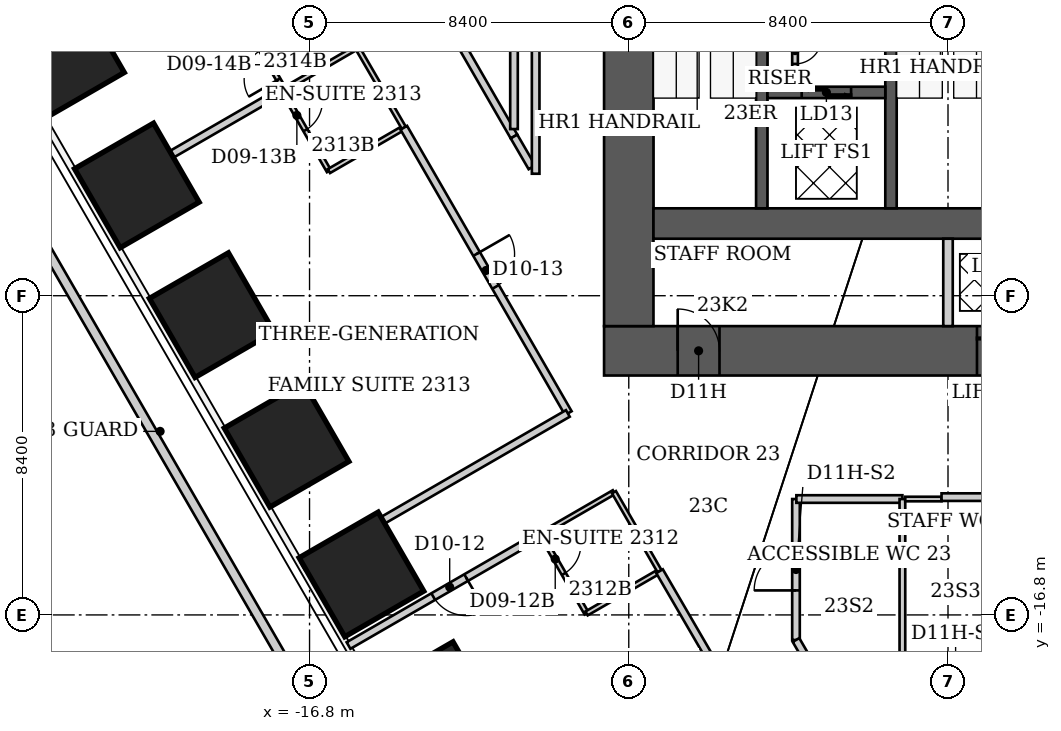
"""IFC4 building model, lengths in metres.
Left out: names, types, materials, properties, quantities, classifications, styles, units other than length and angle.
Written with IfcOpenShell. Run it as: python <this file> out.ifc"""

import sys

from ifc_helpers import new_model, si_unit, direction, frame, frame_2d, origin, origin_2d, place, context, subcontext, project, spatial, rectangle, extrude, clip, halfspace, element, fill, save


model = new_model("IFC4")
c1 = context("Model", 3, precision=1e-05, world=origin(), true_north=direction((0.0, 1.0)))
c2 = subcontext(c1, "Body", "Model", "MODEL_VIEW")
j1 = project(units=[si_unit("LENGTHUNIT", "METRE"), si_unit("PLANEANGLEUNIT", "RADIAN")], contexts=[c1])
p1 = place(None, origin())
s1 = spatial("IfcSite", under=j1, at=p1, CompositionType="ELEMENT")
p2 = place(p1, origin())
s2 = spatial("IfcBuilding", under=s1, at=p2, CompositionType="ELEMENT")
p3 = place(p2, frame((0.0, 0.0, 96.8)))
s3 = spatial("IfcBuildingStorey", under=s2, at=p3, CompositionType="ELEMENT", Elevation=96.8)
p4 = place(p3, frame((-13.464, -19.147, -0.064), z_axis=(0.0, 0.0, 1.0), x_axis=(-0.866025403784, -0.5, 0.0)))
e1 = element("IfcColumn", 1, at=p4, inside=s3, PredefinedType="COLUMN", context=c2, shape_type="SweptSolid", body=[
    clip(extrude(rectangle(XDim=2.4, YDim=2.4, at=origin_2d()), origin(), (0.0, 0.0, 1.0), 3.865), halfspace(frame((0.0, 0.0, 0.064)), True)),
])
p5 = place(p3, frame((-15.434, -15.735, -0.056), z_axis=(0.0, 0.0, 1.0), x_axis=(-0.866025403784, -0.5, 0.0)))
e2 = element("IfcColumn", 2, at=p5, inside=s3, PredefinedType="COLUMN", context=c2, shape_type="SweptSolid", body=[
    clip(extrude(rectangle(XDim=2.4, YDim=2.4, at=origin_2d()), origin(), (0.0, 0.0, 1.0), 3.856), halfspace(frame((0.0, 0.0, 0.056)), True)),
])
for number, where, z_axis, x_axis in (
    (3, (-17.404, -12.323, -0.048), (0.0, 0.0, 1.0), (-0.866, -0.5, 0.0)),
    (4, (-19.374, -8.911, -0.048), (0.0, 0.0, 1.0), (-0.866, -0.5, 0.0)),
):
    element("IfcColumn", number, at=place(p3, frame(where, z_axis=z_axis, x_axis=x_axis)), inside=s3, PredefinedType="COLUMN", context=c2, shape_type="SweptSolid", body=[
        clip(extrude(rectangle(XDim=2.4, YDim=2.4, at=origin_2d()), origin(), (0.0, 0.0, 1.0), 3.848), halfspace(frame((0.0, 0.0, 0.048)), True)),
    ])
p6 = place(p3, frame((-21.344, -5.499, -0.056), z_axis=(0.0, 0.0, 1.0), x_axis=(-0.866025403784, -0.5, 0.0)))
e5 = element("IfcColumn", 5, at=p6, inside=s3, PredefinedType="COLUMN", context=c2, shape_type="SweptSolid", body=[
    clip(extrude(rectangle(XDim=2.4, YDim=2.4, at=origin_2d()), origin(), (0.0, 0.0, 1.0), 3.856), halfspace(frame((0.0, 0.0, 0.056)), True)),
])
p7 = place(p3, frame((-23.314, -2.087, -0.064), z_axis=(0.0, 0.0, 1.0), x_axis=(-0.866025403784, -0.5, 0.0)))
e6 = element("IfcColumn", 6, at=p7, inside=s3, PredefinedType="COLUMN", context=c2, shape_type="SweptSolid", body=[
    clip(extrude(rectangle(XDim=2.4, YDim=2.4, at=origin_2d()), origin(), (0.0, 0.0, 1.0), 3.865), halfspace(frame((0.0, 0.0, 0.064)), True)),
])
p8 = place(p3, frame((-9.05, -9.85, 0.0), z_axis=(0.0, 0.0, 1.0), x_axis=(1.0, 0.0, 0.0)))
e7 = element("IfcWall", 7, at=p8, inside=s3, PredefinedType="SHEAR", context=c2, shape_type="SweptSolid", body=[
    extrude(rectangle(XDim=18.1, YDim=1.3, at=frame_2d((9.05, 0.0))), origin(), (0.0, 0.0, 1.0), 3.8),
])
p9 = place(p8, frame((1.938, 0.0, 0.0)))
e8 = element("IfcOpeningElement", 8, at=p9, cuts=e7, PredefinedType="OPENING", context=c2, shape_type="SweptSolid", body=[
    extrude(rectangle(XDim=1.1, YDim=2.2, at=frame_2d((0.55, 1.1))), frame((0.0, 0.65, 0.0), z_axis=(0.0, -1.0, 0.0), x_axis=(1.0, 0.0, 0.0)), (0.0, 0.0, 1.0), 1.3),
])
p10 = place(p8, frame((9.812, 0.0, 0.0)))
e9 = element("IfcOpeningElement", 9, at=p10, cuts=e7, PredefinedType="OPENING", context=c2, shape_type="SweptSolid", body=[
    extrude(rectangle(XDim=1.1, YDim=2.1, at=frame_2d((0.55, 1.05))), frame((0.0, 0.65, 0.0), z_axis=(0.0, -1.0, 0.0), x_axis=(1.0, 0.0, 0.0)), (0.0, 0.0, 1.0), 1.3),
])
p11 = place(p8, frame((12.438, 0.0, 0.0)))
e10 = element("IfcOpeningElement", 10, at=p11, cuts=e7, PredefinedType="OPENING", context=c2, shape_type="SweptSolid", body=[
    extrude(rectangle(XDim=1.1, YDim=2.1, at=frame_2d((0.55, 1.05))), frame((0.0, 0.65, 0.0), z_axis=(0.0, -1.0, 0.0), x_axis=(1.0, 0.0, 0.0)), (0.0, 0.0, 1.0), 1.3),
])
p12 = place(p8, frame((15.062, 0.0, 0.0)))
e11 = element("IfcOpeningElement", 11, at=p12, cuts=e7, PredefinedType="OPENING", context=c2, shape_type="SweptSolid", body=[
    extrude(rectangle(XDim=1.1, YDim=2.1, at=frame_2d((0.55, 1.05))), frame((0.0, 0.65, 0.0), z_axis=(0.0, -1.0, 0.0), x_axis=(1.0, 0.0, 0.0)), (0.0, 0.0, 1.0), 1.3),
])
p13 = place(p3, frame((-8.4, -9.2, 0.0), z_axis=(0.0, 0.0, 1.0), x_axis=(0.0, 1.0, 0.0)))
e12 = element("IfcWall", 12, at=p13, inside=s3, PredefinedType="SHEAR", context=c2, shape_type="SweptSolid", body=[
    extrude(rectangle(XDim=15.3, YDim=1.3, at=frame_2d((7.65, 0.0))), origin(), (0.0, 0.0, 1.0), 3.8),
])
p14 = place(p13, frame((10.7, 0.0, 0.0)))
e13 = element("IfcOpeningElement", 13, at=p14, cuts=e12, PredefinedType="OPENING", context=c2, shape_type="SweptSolid", body=[
    extrude(rectangle(XDim=1.2, YDim=2.2, at=frame_2d((0.6, 1.1))), frame((0.0, 0.65, 0.0), z_axis=(0.0, -1.0, 0.0), x_axis=(1.0, 0.0, 0.0)), (0.0, 0.0, 1.0), 1.3),
])
p15 = place(p3, frame((-7.75, -6.5, 0.0), z_axis=(0.0, 0.0, 1.0), x_axis=(1.0, 0.0, 0.0)))
e14 = element("IfcWall", 14, at=p15, inside=s3, PredefinedType="SHEAR", context=c2, shape_type="SweptSolid", body=[
    extrude(rectangle(XDim=15.5, YDim=0.8, at=frame_2d((7.75, 0.0))), origin(), (0.0, 0.0, 1.0), 3.8),
])
for number, where, z_axis, x_axis in (
    (15, (-4.9, -6.1, 0.0), (0.0, 0.0, 1.0), (0.0, 1.0, 0.0)),
    (16, (-1.5, -6.1, 0.0), (0.0, 0.0, 1.0), (0.0, 1.0, 0.0)),
):
    element("IfcWall", number, at=place(p3, frame(where, z_axis=z_axis, x_axis=x_axis)), inside=s3, PredefinedType="SHEAR", context=c2, shape_type="SweptSolid", body=[
        extrude(rectangle(XDim=7.2, YDim=0.3, at=frame_2d((3.6, 0.0))), origin(), (0.0, 0.0, 1.0), 3.8),
    ])
p16 = place(p3, frame((-4.75, -3.05, 0.0), z_axis=(0.0, 0.0, 1.0), x_axis=(1.0, 0.0, 0.0)))
e17 = element("IfcWall", 17, at=p16, inside=s3, PredefinedType="SHEAR", context=c2, shape_type="SweptSolid", body=[
    extrude(rectangle(XDim=3.1, YDim=0.3, at=frame_2d((1.55, 0.0))), origin(), (0.0, 0.0, 1.0), 3.8),
])
p17 = place(p16, frame((0.9, 0.0, 0.0)))
e18 = element("IfcOpeningElement", 18, at=p17, cuts=e17, PredefinedType="OPENING", context=c2, shape_type="SweptSolid", body=[
    extrude(rectangle(XDim=1.3, YDim=2.1, at=frame_2d((0.65, 1.05))), frame((0.0, 0.15, 0.0), z_axis=(0.0, -1.0, 0.0), x_axis=(1.0, 0.0, 0.0)), (0.0, 0.0, 1.0), 0.3),
])
p18 = place(p3, frame((0.0, -9.2, 0.0), z_axis=(0.0, 0.0, 1.0), x_axis=(0.0, 1.0, 0.0)))
e19 = element("IfcWall", 19, at=p18, inside=s3, PredefinedType="PARTITIONING", context=c2, shape_type="SweptSolid", body=[
    extrude(rectangle(XDim=2.3, YDim=0.25, at=frame_2d((1.15, 0.0))), origin(), (0.0, 0.0, 1.0), 3.8),
])
p19 = place(p3, frame((-30.775, 5.038, 0.0), z_axis=(0.0, 0.0, 1.0), x_axis=(0.499999235055, -0.866025845425, 0.0)))
e20 = element("IfcWall", 20, at=p19, inside=s3, PredefinedType="PARAPET", context=c2, shape_type="SweptSolid", body=[
    extrude(rectangle(XDim=39.5, YDim=0.25, at=frame_2d((19.75, 0.0))), origin(), (0.0, 0.0, 1.0), 1.1),
])
p20 = place(p3, frame((-18.81, -0.66, 0.0), z_axis=(0.0, 0.0, 1.0), x_axis=(0.501789229896, -0.86498992408, 0.0)))
e21 = element("IfcWall", 21, at=p20, inside=s3, PredefinedType="PARTITIONING", context=c2, shape_type="SweptSolid", body=[
    extrude(rectangle(XDim=2.671, YDim=0.12, at=frame_2d((1.335, 0.0))), origin(), (0.0, 0.0, 1.0), 3.64),
])
p21 = place(p20, frame((1.47, 0.0, 0.0)))
e22 = element("IfcOpeningElement", 22, at=p21, cuts=e21, PredefinedType="OPENING", context=c2, shape_type="SweptSolid", body=[
    extrude(rectangle(XDim=0.9, YDim=2.03, at=frame_2d((0.45, 1.015))), frame((0.0, 0.06, 0.0), z_axis=(0.0, -1.0, 0.0), x_axis=(1.0, 0.0, 0.0)), (0.0, 0.0, 1.0), 0.12),
])
p22 = place(p3, frame((-17.51, -3.0, 0.0), z_axis=(0.0, 0.0, 1.0), x_axis=(0.864434275542, 0.502745843611, 0.0)))
e23 = element("IfcWall", 23, at=p22, inside=s3, PredefinedType="PARTITIONING", context=c2, shape_type="SweptSolid", body=[
    extrude(rectangle(XDim=2.267, YDim=0.12, at=frame_2d((1.134, 0.0))), origin(), (0.0, 0.0, 1.0), 3.64),
])
p23 = place(p3, frame((-17.508, -3.004, 0.0), z_axis=(0.0, 0.0, 1.0), x_axis=(0.498775507858, -0.866731211369, 0.0)))
e24 = element("IfcWall", 24, at=p23, inside=s3, PredefinedType="PARTITIONING", context=c2, shape_type="SweptSolid", body=[
    extrude(rectangle(XDim=2.441, YDim=0.12, at=frame_2d((1.22, 0.0))), origin(), (0.0, 0.0, 1.0), 3.64),
])
p24 = place(p23, frame((0.3, 0.0, 0.0)))
e25 = element("IfcOpeningElement", 25, at=p24, cuts=e24, PredefinedType="OPENING", context=c2, shape_type="SweptSolid", body=[
    extrude(rectangle(XDim=0.9, YDim=2.03, at=frame_2d((0.45, 1.015))), frame((0.0, 0.06, 0.0), z_axis=(0.0, -1.0, 0.0), x_axis=(1.0, 0.0, 0.0)), (0.0, 0.0, 1.0), 0.12),
])
p25 = place(p3, frame((-17.47, -2.97, 0.0), z_axis=(0.0, 0.0, 1.0), x_axis=(-0.865919350456, -0.50018364478, 0.0)))
e26 = element("IfcWall", 26, at=p25, inside=s3, PredefinedType="PARTITIONING", context=c2, shape_type="SweptSolid", body=[
    extrude(rectangle(XDim=5.758, YDim=0.2, at=frame_2d((2.879, 0.0))), origin(), (0.0, 0.0, 1.0), 3.64),
])
p26 = place(p3, frame((-16.29, -5.12, 0.0), z_axis=(0.0, 0.0, 1.0), x_axis=(0.865497265561, 0.500913648553, 0.0)))
e27 = element("IfcWall", 27, at=p26, inside=s3, PredefinedType="PARTITIONING", context=c2, shape_type="SweptSolid", body=[
    extrude(rectangle(XDim=2.276, YDim=0.12, at=frame_2d((1.138, 0.0))), origin(), (0.0, 0.0, 1.0), 3.64),
])
p27 = place(p3, frame((-15.774, -17.605, 0.0), z_axis=(0.0, 0.0, 1.0), x_axis=(0.865924141063, 0.500175351175, 0.0)))
e28 = element("IfcWall", 28, at=p27, inside=s3, PredefinedType="PARTITIONING", context=c2, shape_type="SweptSolid", body=[
    extrude(rectangle(XDim=5.848, YDim=0.2, at=frame_2d((2.924, 0.0))), origin(), (0.0, 0.0, 1.0), 3.64),
])
p28 = place(p27, frame((2.574, 0.0, 0.0)))
e29 = element("IfcOpeningElement", 29, at=p28, cuts=e28, PredefinedType="OPENING", context=c2, shape_type="SweptSolid", body=[
    extrude(rectangle(XDim=1.0, YDim=2.13, at=frame_2d((0.5, 1.065))), frame((0.0, 0.1, 0.0), z_axis=(0.0, -1.0, 0.0), x_axis=(1.0, 0.0, 0.0)), (0.0, 0.0, 1.0), 0.2),
])
p29 = place(p3, frame((-15.55, -1.86, 0.0), z_axis=(0.0, 0.0, 1.0), x_axis=(0.501856726365, -0.86495076519, 0.0)))
e30 = element("IfcWall", 30, at=p29, inside=s3, PredefinedType="PARTITIONING", context=c2, shape_type="SweptSolid", body=[
    extrude(rectangle(XDim=2.451, YDim=0.12, at=frame_2d((1.226, 0.0))), origin(), (0.0, 0.0, 1.0), 3.64),
])
p30 = place(p3, frame((-14.32, -3.98, 0.0), z_axis=(0.0, 0.0, 1.0), x_axis=(0.499495696009, -0.866316368118, 0.0)))
e31 = element("IfcWall", 31, at=p30, inside=s3, PredefinedType="PARTITIONING", context=c2, shape_type="SweptSolid", body=[
    extrude(rectangle(XDim=8.669, YDim=0.2, at=frame_2d((4.334, 0.0))), origin(), (0.0, 0.0, 1.0), 3.64),
])
p31 = place(p30, frame((3.834, 0.0, 0.0)))
e32 = element("IfcOpeningElement", 32, at=p31, cuts=e31, PredefinedType="OPENING", context=c2, shape_type="SweptSolid", body=[
    extrude(rectangle(XDim=1.0, YDim=2.13, at=frame_2d((0.5, 1.065))), frame((0.0, 0.1, 0.0), z_axis=(0.0, -1.0, 0.0), x_axis=(1.0, 0.0, 0.0)), (0.0, 0.0, 1.0), 0.2),
])
p32 = place(p3, frame((-11.42, -4.21, 0.0), z_axis=(0.0, 0.0, 1.0), x_axis=(-0.499446957289, 0.866344467781, 0.0)))
e33 = element("IfcWall", 33, at=p32, inside=s3, PredefinedType="PARTITIONING", context=c2, shape_type="SweptSolid", body=[
    extrude(rectangle(XDim=9.13, YDim=0.2, at=frame_2d((4.565, 0.0))), origin(), (0.0, 0.0, 1.0), 3.64),
])
p33 = place(p32, frame((4.015, 0.0, 0.0)))
e34 = element("IfcOpeningElement", 34, at=p33, cuts=e33, PredefinedType="OPENING", context=c2, shape_type="SweptSolid", body=[
    extrude(rectangle(XDim=1.1, YDim=2.2, at=frame_2d((0.55, 1.1))), frame((0.0, 0.1, 0.0), z_axis=(0.0, -1.0, 0.0), x_axis=(1.0, 0.0, 0.0)), (0.0, 0.0, 1.0), 0.2),
])
p34 = place(p3, frame((-11.42, 10.98, 0.0), z_axis=(0.0, 0.0, 1.0), x_axis=(0.0, -1.0, 0.0)))
e35 = element("IfcWall", 35, at=p34, inside=s3, PredefinedType="PARTITIONING", context=c2, shape_type="SweptSolid", body=[
    extrude(rectangle(XDim=14.995, YDim=0.2, at=frame_2d((7.498, 0.0))), origin(), (0.0, 0.0, 1.0), 3.64),
])
p35 = place(p3, frame((-10.948, -5.021, 0.0), z_axis=(0.0, 0.0, 1.0), x_axis=(-0.502706337432, 0.86445725071, 0.0)))
e36 = element("IfcWall", 36, at=p35, inside=s3, PredefinedType="PARTITIONING", context=c2, shape_type="SweptSolid", body=[
    extrude(rectangle(XDim=0.939, YDim=0.2, at=frame_2d((0.469, 0.0))), origin(), (0.0, 0.0, 1.0), 3.64),
])
p36 = place(p3, frame((-10.85, 9.2, 0.0), z_axis=(0.0, 0.0, 1.0), x_axis=(0.0, -1.0, 0.0)))
e37 = element("IfcWall", 37, at=p36, inside=s3, PredefinedType="PARTITIONING", context=c2, shape_type="SweptSolid", body=[
    extrude(rectangle(XDim=14.39, YDim=0.2, at=frame_2d((7.195, 0.0))), origin(), (0.0, 0.0, 1.0), 3.64),
])
p37 = place(p3, frame((-10.71, -14.68, 0.0), z_axis=(0.0, 0.0, 1.0), x_axis=(0.499693115345, -0.866202511239, 0.0)))
e38 = element("IfcWall", 38, at=p37, inside=s3, PredefinedType="PARTITIONING", context=c2, shape_type="SweptSolid", body=[
    extrude(rectangle(XDim=2.401, YDim=0.12, at=frame_2d((1.201, 0.0))), origin(), (0.0, 0.0, 1.0), 3.64),
])
p38 = place(p37, frame((0.3, 0.0, 0.0)))
e39 = element("IfcOpeningElement", 39, at=p38, cuts=e38, PredefinedType="OPENING", context=c2, shape_type="SweptSolid", body=[
    extrude(rectangle(XDim=0.9, YDim=2.03, at=frame_2d((0.45, 1.015))), frame((0.0, 0.06, 0.0), z_axis=(0.0, -1.0, 0.0), x_axis=(1.0, 0.0, 0.0)), (0.0, 0.0, 1.0), 0.12),
])
p39 = place(p3, frame((-10.71, -14.68, 0.0), z_axis=(0.0, 0.0, 1.0), x_axis=(0.86575271903, 0.500472006703, 0.0)))
e40 = element("IfcWall", 40, at=p39, inside=s3, PredefinedType="PARTITIONING", context=c2, shape_type="SweptSolid", body=[
    extrude(rectangle(XDim=2.218, YDim=0.12, at=frame_2d((1.109, 0.0))), origin(), (0.0, 0.0, 1.0), 3.64),
])
p40 = place(p3, frame((-10.003, -11.498, 0.0), z_axis=(0.0, 0.0, 1.0), x_axis=(-0.865882003792, -0.500248293859, 0.0)))
e41 = element("IfcWall", 41, at=p40, inside=s3, PredefinedType="PARTITIONING", context=c2, shape_type="SweptSolid", body=[
    extrude(rectangle(XDim=8.051, YDim=0.2, at=frame_2d((4.025, 0.0))), origin(), (0.0, 0.0, 1.0), 3.64),
])
p41 = place(p3, frame((-9.51, -16.76, 0.0), z_axis=(0.0, 0.0, 1.0), x_axis=(0.865705017107, 0.500554515868, 0.0)))
e42 = element("IfcWall", 42, at=p41, inside=s3, PredefinedType="PARTITIONING", context=c2, shape_type="SweptSolid", body=[
    extrude(rectangle(XDim=2.218, YDim=0.12, at=frame_2d((1.109, 0.0))), origin(), (0.0, 0.0, 1.0), 3.64),
])
p42 = place(p3, frame((-8.79, -13.57, 0.0), z_axis=(0.0, 0.0, 1.0), x_axis=(0.499737123639, -0.866177122335, 0.0)))
e43 = element("IfcWall", 43, at=p42, inside=s3, PredefinedType="PARTITIONING", context=c2, shape_type="SweptSolid", body=[
    extrude(rectangle(XDim=2.401, YDim=0.12, at=frame_2d((1.201, 0.0))), origin(), (0.0, 0.0, 1.0), 3.64),
])
p43 = place(p3, frame((-7.59, -15.65, 0.0), z_axis=(0.0, 0.0, 1.0), x_axis=(0.502507574725, -0.864572806271, 0.0)))
e44 = element("IfcWall", 44, at=p43, inside=s3, PredefinedType="PARTITIONING", context=c2, shape_type="SweptSolid", body=[
    extrude(rectangle(XDim=2.707, YDim=0.2, at=frame_2d((1.353, 0.0))), origin(), (0.0, 0.0, 1.0), 3.64),
])
p44 = place(p3, frame((-4.0, -17.46, 0.0), z_axis=(0.0, 0.0, 1.0), x_axis=(0.0, 1.0, 0.0)))
e45 = element("IfcWall", 45, at=p44, inside=s3, PredefinedType="PARTITIONING", context=c2, shape_type="SweptSolid", body=[
    extrude(rectangle(XDim=3.71, YDim=0.2, at=frame_2d((1.855, 0.0))), origin(), (0.0, 0.0, 1.0), 2.878),
])
p45 = place(p44, frame((1.305, 0.0, 0.0)))
e46 = element("IfcOpeningElement", 46, at=p45, cuts=e45, PredefinedType="OPENING", context=c2, shape_type="SweptSolid", body=[
    extrude(rectangle(XDim=1.1, YDim=2.2, at=frame_2d((0.55, 1.1))), frame((0.0, 0.1, 0.0), z_axis=(0.0, -1.0, 0.0), x_axis=(1.0, 0.0, 0.0)), (0.0, 0.0, 1.0), 0.2),
])
p46 = place(p3, frame((-3.99, -13.75, 0.0), z_axis=(0.0, 0.0, 1.0), x_axis=(1.0, 0.0, 0.0)))
e47 = element("IfcWall", 47, at=p46, inside=s3, PredefinedType="PARTITIONING", context=c2, shape_type="SweptSolid", body=[
    extrude(rectangle(XDim=2.79, YDim=0.2, at=frame_2d((1.395, 0.0))), origin(), (0.0, 0.0, 1.0), 3.64),
])
p47 = place(p3, frame((-3.75, -17.89, 0.0), z_axis=(0.0, 0.0, 1.0), x_axis=(-0.502680181512, 0.864472460588, 0.0)))
e48 = element("IfcWall", 48, at=p47, inside=s3, PredefinedType="PARTITIONING", context=c2, shape_type="SweptSolid", body=[
    extrude(rectangle(XDim=0.497, YDim=0.2, at=frame_2d((0.249, 0.0))), origin(), (0.0, 0.0, 1.0), 3.64),
])
p48 = place(p3, frame((-1.2, -13.75, 0.0), z_axis=(0.0, 0.0, 1.0), x_axis=(0.0, -1.0, 0.0)))
e49 = element("IfcWall", 49, at=p48, inside=s3, PredefinedType="PARTITIONING", context=c2, shape_type="SweptSolid", body=[
    extrude(rectangle(XDim=4.14, YDim=0.15, at=frame_2d((2.07, 0.0))), origin(), (0.0, 0.0, 1.0), 3.64),
])
p49 = place(p3, frame((-1.125, -13.75, 0.0), z_axis=(0.0, 0.0, 1.0), x_axis=(1.0, 0.0, 0.0)))
e50 = element("IfcWall", 50, at=p49, inside=s3, PredefinedType="PARTITIONING", context=c2, shape_type="SweptSolid", body=[
    extrude(rectangle(XDim=0.955, YDim=0.12, at=frame_2d((0.478, 0.0))), origin(), (0.0, 0.0, 1.0), 3.64),
])
p50 = place(p3, frame((8.535, -13.7, 0.0), z_axis=(0.0, 0.0, 1.0), x_axis=(-1.0, 0.0, 0.0)))
e51 = element("IfcWall", 51, at=p50, inside=s3, PredefinedType="PARTITIONING", context=c2, shape_type="SweptSolid", body=[
    extrude(rectangle(XDim=8.705, YDim=0.2, at=frame_2d((4.353, 0.0))), origin(), (0.0, 0.0, 1.0), 3.64),
])
p51 = place(p50, frame((3.802, 0.0, 0.0)))
e52 = element("IfcOpeningElement", 52, at=p51, cuts=e51, PredefinedType="OPENING", context=c2, shape_type="SweptSolid", body=[
    extrude(rectangle(XDim=1.1, YDim=2.2, at=frame_2d((0.55, 1.1))), frame((0.0, 0.1, 0.0), z_axis=(0.0, -1.0, 0.0), x_axis=(1.0, 0.0, 0.0)), (0.0, 0.0, 1.0), 0.2),
])
p52 = place(p3, frame((-4.025, -2.9, 0.0), z_axis=(0.0, 0.0, 1.0), x_axis=(0.0, 1.0, 0.0)))
e53 = element("IfcWall", 53, at=p52, inside=s3, PredefinedType="PARTITIONING", context=c2, shape_type="SweptSolid", body=[
    extrude(rectangle(XDim=1.775, YDim=0.15, at=frame_2d((0.887, 0.0))), origin(), (0.0, 0.0, 1.0), 3.64),
])
p53 = place(p52, frame((0.6, 0.0, 0.0)))
e54 = element("IfcOpeningElement", 54, at=p53, cuts=e53, PredefinedType="OPENING", context=c2, shape_type="SweptSolid", body=[
    extrude(rectangle(XDim=0.7, YDim=2.1, at=frame_2d((0.35, 1.05))), frame((0.0, 0.075, 0.0), z_axis=(0.0, -1.0, 0.0), x_axis=(1.0, 0.0, 0.0)), (0.0, 0.0, 1.0), 0.15),
])
p54 = place(p28, origin())
e55 = element("IfcDoor", 55, at=p54, inside=s3, OperationType="SINGLE_SWING_RIGHT", PredefinedType="DOOR", context=c2, shape_type="SweptSolid", body=[
    extrude(rectangle(XDim=1.0, YDim=2.13, at=frame_2d((0.5, 1.065))), frame((0.0, 0.025, 0.0), z_axis=(0.0, -1.0, 0.0), x_axis=(1.0, 0.0, 0.0)), (0.0, 0.0, 1.0), 0.05),
])
fill(e29, e55)
p55 = place(p38, origin())
e56 = element("IfcDoor", 56, at=p55, inside=s3, OperationType="SINGLE_SWING_LEFT", PredefinedType="DOOR", context=c2, shape_type="SweptSolid", body=[
    extrude(rectangle(XDim=0.9, YDim=2.03, at=frame_2d((0.45, 1.015))), frame((0.0, 0.025, 0.0), z_axis=(0.0, -1.0, 0.0), x_axis=(1.0, 0.0, 0.0)), (0.0, 0.0, 1.0), 0.05),
])
fill(e39, e56)
p56 = place(p31, origin())
e57 = element("IfcDoor", 57, at=p56, inside=s3, OperationType="SINGLE_SWING_LEFT", PredefinedType="DOOR", context=c2, shape_type="SweptSolid", body=[
    extrude(rectangle(XDim=1.0, YDim=2.13, at=frame_2d((0.5, 1.065))), frame((0.0, 0.025, 0.0), z_axis=(0.0, -1.0, 0.0), x_axis=(1.0, 0.0, 0.0)), (0.0, 0.0, 1.0), 0.05),
])
fill(e32, e57)
p57 = place(p24, origin())
e58 = element("IfcDoor", 58, at=p57, inside=s3, OperationType="SINGLE_SWING_LEFT", PredefinedType="DOOR", context=c2, shape_type="SweptSolid", body=[
    extrude(rectangle(XDim=0.9, YDim=2.03, at=frame_2d((0.45, 1.015))), frame((0.0, 0.025, 0.0), z_axis=(0.0, -1.0, 0.0), x_axis=(1.0, 0.0, 0.0)), (0.0, 0.0, 1.0), 0.05),
])
fill(e25, e58)
p58 = place(p21, origin())
e59 = element("IfcDoor", 59, at=p58, inside=s3, OperationType="SINGLE_SWING_RIGHT", PredefinedType="DOOR", context=c2, shape_type="SweptSolid", body=[
    extrude(rectangle(XDim=0.9, YDim=2.03, at=frame_2d((0.45, 1.015))), frame((0.0, 0.025, 0.0), z_axis=(0.0, -1.0, 0.0), x_axis=(1.0, 0.0, 0.0)), (0.0, 0.0, 1.0), 0.05),
])
fill(e22, e59)
p59 = place(p45, origin())
e60 = element("IfcDoor", 60, at=p59, inside=s3, OperationType="SINGLE_SWING_LEFT", PredefinedType="DOOR", context=c2, shape_type="SweptSolid", body=[
    extrude(rectangle(XDim=1.1, YDim=2.2, at=frame_2d((0.55, 1.1))), frame((0.0, 0.025, 0.0), z_axis=(0.0, -1.0, 0.0), x_axis=(1.0, 0.0, 0.0)), (0.0, 0.0, 1.0), 0.05),
])
fill(e46, e60)
p60 = place(p53, origin())
e61 = element("IfcDoor", 61, at=p60, inside=s3, OperationType="SINGLE_SWING_RIGHT", PredefinedType="DOOR", context=c2, shape_type="SweptSolid", body=[
    extrude(rectangle(XDim=0.7, YDim=2.1, at=frame_2d((0.35, 1.05))), frame((0.0, 0.025, 0.0), z_axis=(0.0, -1.0, 0.0), x_axis=(1.0, 0.0, 0.0)), (0.0, 0.0, 1.0), 0.05),
])
fill(e54, e61)
p61 = place(p9, origin())
e62 = element("IfcDoor", 62, at=p61, inside=s3, OperationType="SINGLE_SWING_LEFT", PredefinedType="DOOR", context=c2, shape_type="SweptSolid", body=[
    extrude(rectangle(XDim=1.1, YDim=2.2, at=frame_2d((0.55, 1.1))), frame((0.0, 0.025, 0.0), z_axis=(0.0, -1.0, 0.0), x_axis=(1.0, 0.0, 0.0)), (0.0, 0.0, 1.0), 0.05),
])
fill(e8, e62)
p62 = place(p10, origin())
e63 = element("IfcDoor", 63, at=p62, inside=s3, OperationType="DOUBLE_DOOR_SLIDING", PredefinedType="DOOR", context=c2, shape_type="SweptSolid", body=[
    extrude(rectangle(XDim=1.1, YDim=2.1, at=frame_2d((0.55, 1.05))), frame((0.0, 0.025, 0.0), z_axis=(0.0, -1.0, 0.0), x_axis=(1.0, 0.0, 0.0)), (0.0, 0.0, 1.0), 0.05),
])
fill(e9, e63)
p63 = place(p17, origin())
e64 = element("IfcDoor", 64, at=p63, inside=s3, OperationType="DOUBLE_DOOR_SLIDING", PredefinedType="DOOR", context=c2, shape_type="SweptSolid", body=[
    extrude(rectangle(XDim=1.3, YDim=2.1, at=frame_2d((0.65, 1.05))), frame((0.0, 0.025, 0.0), z_axis=(0.0, -1.0, 0.0), x_axis=(1.0, 0.0, 0.0)), (0.0, 0.0, 1.0), 0.05),
])
fill(e18, e64)
save(model, sys.argv[1])
